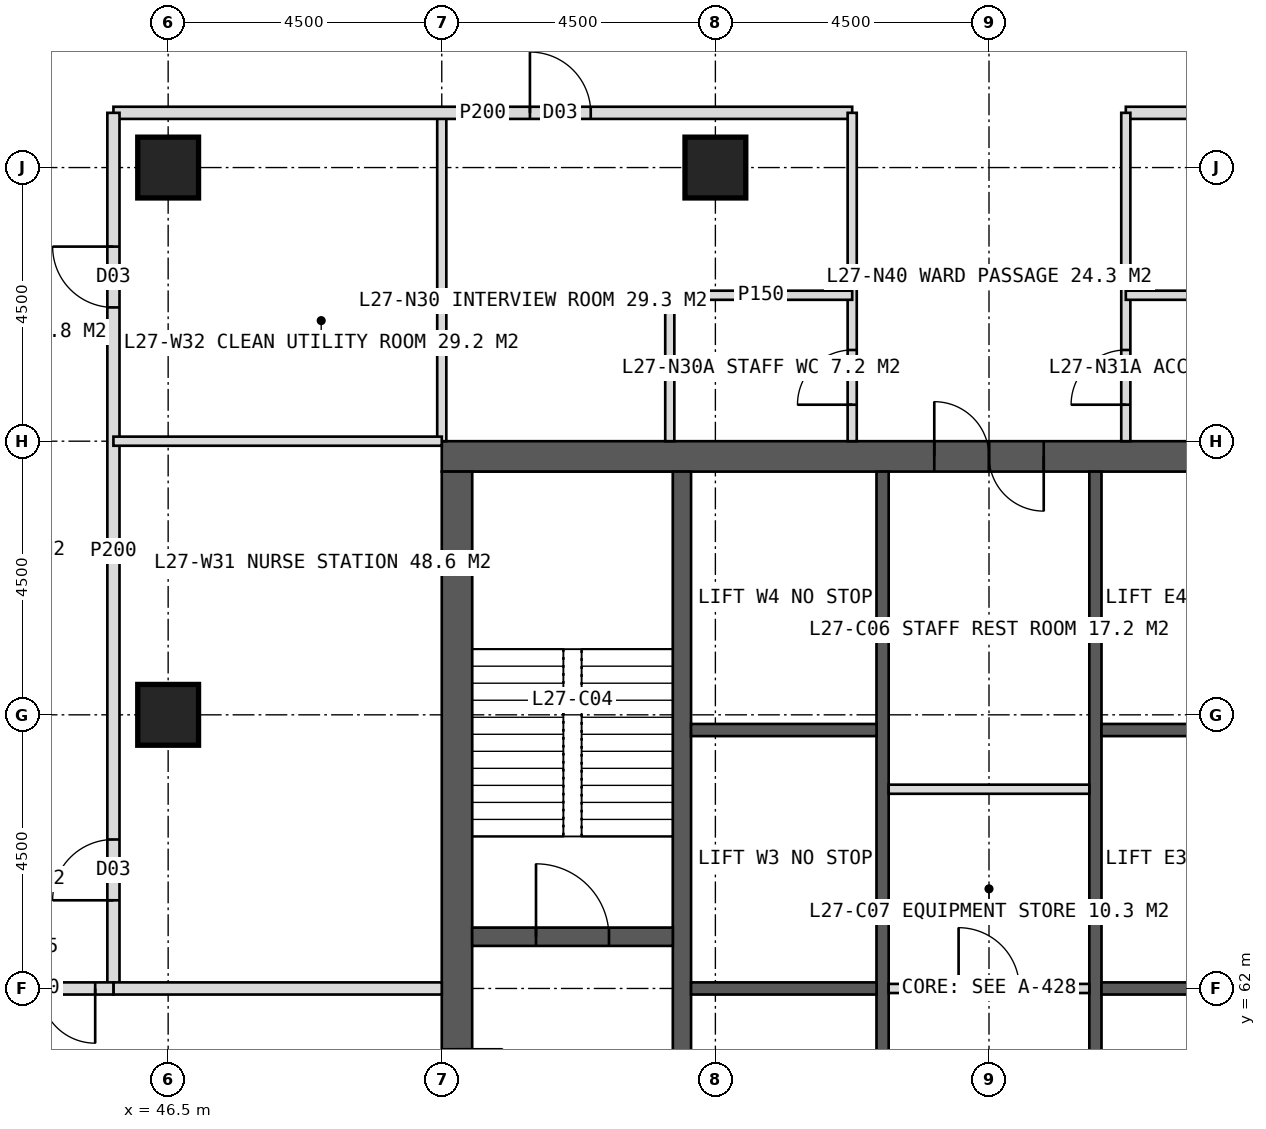
"""IFC4 building model, lengths in metres.
Left out: names, types, materials, properties, quantities, classifications, styles, units other than length and angle.
Written with IfcOpenShell. Run it as: python <this file> out.ifc"""

import sys

from ifc_helpers import new_model, si_unit, direction, frame, frame_2d, origin, origin_2d, place, context, subcontext, project, spatial, rectangle, hollow_rectangle, extrude, element, fill, save


model = new_model("IFC4")
c1 = context("Model", 3, precision=1e-05, world=origin(), true_north=direction((0.0, 1.0)))
c2 = subcontext(c1, "Body", "Model", "MODEL_VIEW")
j1 = project(units=[si_unit("LENGTHUNIT", "METRE"), si_unit("PLANEANGLEUNIT", "RADIAN")], contexts=[c1])
p1 = place(None, origin())
s1 = spatial("IfcSite", under=j1, at=p1, CompositionType="ELEMENT")
p2 = place(p1, origin())
s2 = spatial("IfcBuilding", under=s1, at=p2, CompositionType="ELEMENT")
p3 = place(p2, frame((0.0, 0.0, 116.0)))
s3 = spatial("IfcBuildingStorey", under=s2, at=p3, CompositionType="ELEMENT", Elevation=116.0)
p4 = place(p3, frame((51.0, 70.75, 0.0), z_axis=(0.0, 0.0, 1.0), x_axis=(1.0, 0.0, 0.0)))
e1 = element("IfcWall", 1, at=p4, inside=s3, PredefinedType="SHEAR", context=c2, shape_type="SweptSolid", body=[
    extrude(rectangle(XDim=18.0, YDim=0.5, at=frame_2d((9.0, 0.0))), origin(), (0.0, 0.0, 1.0), 4.0),
])
p5 = place(p4, frame((8.1, 0.0, 0.0)))
e2 = element("IfcOpeningElement", 2, at=p5, cuts=e1, PredefinedType="OPENING", context=c2, shape_type="SweptSolid", body=[
    extrude(rectangle(XDim=1.8, YDim=2.2, at=frame_2d((0.9, 1.1))), frame((0.0, 0.26, 0.0), z_axis=(0.0, -1.0, 0.0), x_axis=(1.0, 0.0, 0.0)), (0.0, 0.0, 1.0), 0.52),
])
p6 = place(p3, frame((51.25, 53.5, 0.0), z_axis=(0.0, 0.0, 1.0), x_axis=(0.0, 1.0, 0.0)))
e3 = element("IfcWall", 3, at=p6, inside=s3, PredefinedType="SHEAR", context=c2, shape_type="SweptSolid", body=[
    extrude(rectangle(XDim=17.0, YDim=0.5, at=frame_2d((8.5, 0.0))), origin(), (0.0, 0.0, 1.0), 4.0),
])
p7 = place(p6, frame((6.0, 0.0, 0.0)))
e4 = element("IfcOpeningElement", 4, at=p7, cuts=e3, PredefinedType="OPENING", context=c2, shape_type="SweptSolid", body=[
    extrude(rectangle(XDim=1.5, YDim=2.2, at=frame_2d((0.75, 1.1))), frame((0.0, 0.26, 0.0), z_axis=(0.0, -1.0, 0.0), x_axis=(1.0, 0.0, 0.0)), (0.0, 0.0, 1.0), 0.52),
])
p8 = place(p3, frame((54.95, 53.5, 0.0), z_axis=(0.0, 0.0, 1.0), x_axis=(0.0, 1.0, 0.0)))
e5 = element("IfcWall", 5, at=p8, inside=s3, PredefinedType="SHEAR", context=c2, shape_type="SweptSolid", body=[
    extrude(rectangle(XDim=17.0, YDim=0.3, at=frame_2d((8.5, 0.0))), origin(), (0.0, 0.0, 1.0), 4.0),
])
p9 = place(p3, frame((58.25, 53.5, 0.0), z_axis=(0.0, 0.0, 1.0), x_axis=(0.0, 1.0, 0.0)))
e6 = element("IfcWall", 6, at=p9, inside=s3, PredefinedType="SHEAR", context=c2, shape_type="SweptSolid", body=[
    extrude(rectangle(XDim=17.0, YDim=0.2, at=frame_2d((8.5, 0.0))), origin(), (0.0, 0.0, 1.0), 4.0),
])
p10 = place(p9, frame((1.375, 0.0, 0.0)))
e7 = element("IfcOpeningElement", 7, at=p10, cuts=e6, PredefinedType="OPENING", context=c2, shape_type="SweptSolid", body=[
    extrude(rectangle(XDim=1.4, YDim=2.2, at=frame_2d((0.7, 1.1))), frame((0.0, 0.11, 0.0), z_axis=(0.0, -1.0, 0.0), x_axis=(1.0, 0.0, 0.0)), (0.0, 0.0, 1.0), 0.22),
])
p11 = place(p9, frame((5.675, 0.0, 0.0)))
e8 = element("IfcOpeningElement", 8, at=p11, cuts=e6, PredefinedType="OPENING", context=c2, shape_type="SweptSolid", body=[
    extrude(rectangle(XDim=1.4, YDim=2.2, at=frame_2d((0.7, 1.1))), frame((0.0, 0.11, 0.0), z_axis=(0.0, -1.0, 0.0), x_axis=(1.0, 0.0, 0.0)), (0.0, 0.0, 1.0), 0.22),
])
p12 = place(p3, frame((61.75, 53.5, 0.0), z_axis=(0.0, 0.0, 1.0), x_axis=(0.0, 1.0, 0.0)))
e9 = element("IfcWall", 9, at=p12, inside=s3, PredefinedType="SHEAR", context=c2, shape_type="SweptSolid", body=[
    extrude(rectangle(XDim=17.0, YDim=0.2, at=frame_2d((8.5, 0.0))), origin(), (0.0, 0.0, 1.0), 4.0),
])
p13 = place(p12, frame((1.375, 0.0, 0.0)))
e10 = element("IfcOpeningElement", 10, at=p13, cuts=e9, PredefinedType="OPENING", context=c2, shape_type="SweptSolid", body=[
    extrude(rectangle(XDim=1.4, YDim=2.2, at=frame_2d((0.7, 1.1))), frame((0.0, 0.11, 0.0), z_axis=(0.0, -1.0, 0.0), x_axis=(1.0, 0.0, 0.0)), (0.0, 0.0, 1.0), 0.22),
])
p14 = place(p12, frame((5.675, 0.0, 0.0)))
e11 = element("IfcOpeningElement", 11, at=p14, cuts=e9, PredefinedType="OPENING", context=c2, shape_type="SweptSolid", body=[
    extrude(rectangle(XDim=1.4, YDim=2.2, at=frame_2d((0.7, 1.1))), frame((0.0, 0.11, 0.0), z_axis=(0.0, -1.0, 0.0), x_axis=(1.0, 0.0, 0.0)), (0.0, 0.0, 1.0), 0.22),
])
for number, where, z_axis, x_axis in (
    (12, (55.1, 62.0, 0.0), (0.0, 0.0, 1.0), (1.0, 0.0, 0.0)),
    (13, (61.85, 62.0, 0.0), (0.0, 0.0, 1.0), (1.0, 0.0, 0.0)),
    (14, (55.1, 66.25, 0.0), (0.0, 0.0, 1.0), (1.0, 0.0, 0.0)),
    (15, (61.85, 66.25, 0.0), (0.0, 0.0, 1.0), (1.0, 0.0, 0.0)),
):
    element("IfcWall", number, at=place(p3, frame(where, z_axis=z_axis, x_axis=x_axis)), inside=s3, PredefinedType="SHEAR", context=c2, shape_type="SweptSolid", body=[
        extrude(rectangle(XDim=3.05, YDim=0.2, at=frame_2d((1.525, 0.0))), origin(), (0.0, 0.0, 1.0), 4.0),
    ])
p15 = place(p3, frame((51.5, 62.85, 0.0), z_axis=(0.0, 0.0, 1.0), x_axis=(1.0, 0.0, 0.0)))
e16 = element("IfcWall", 16, at=p15, inside=s3, PredefinedType="SHEAR", context=c2, shape_type="SweptSolid", body=[
    extrude(rectangle(XDim=3.3, YDim=0.3, at=frame_2d((1.65, 0.0))), origin(), (0.0, 0.0, 1.0), 4.0),
])
p16 = place(p15, frame((1.05, 0.0, 0.0)))
e17 = element("IfcOpeningElement", 17, at=p16, cuts=e16, PredefinedType="OPENING", context=c2, shape_type="SweptSolid", body=[
    extrude(rectangle(XDim=1.2, YDim=2.1, at=frame_2d((0.6, 1.05))), frame((0.0, 0.16, 0.0), z_axis=(0.0, -1.0, 0.0), x_axis=(1.0, 0.0, 0.0)), (0.0, 0.0, 1.0), 0.32),
])
for number, where, z_axis, x_axis in (
    (18, (46.5, 75.5, 0.0), (0.0, 0.0, 1.0), (1.0, 0.0, 0.0)),
    (19, (55.5, 75.5, 0.0), (0.0, 0.0, 1.0), (1.0, 0.0, 0.0)),
    (20, (46.5, 66.5, 0.0), (0.0, 0.0, 1.0), (1.0, 0.0, 0.0)),
):
    element("IfcColumn", number, at=place(p3, frame(where, z_axis=z_axis, x_axis=x_axis)), inside=s3, PredefinedType="COLUMN", context=c2, shape_type="SweptSolid", body=[
        extrude(hollow_rectangle(XDim=1.0, YDim=1.0, WallThickness=0.1, at=origin_2d()), origin(), (0.0, 0.0, 1.0), 4.0),
    ])
p17 = place(p3, frame((51.0, 71.0, 0.0), z_axis=(0.0, 0.0, 1.0), x_axis=(0.0, 1.0, 0.0)))
e21 = element("IfcWall", 21, at=p17, inside=s3, PredefinedType="PARTITIONING", context=c2, shape_type="SweptSolid", body=[
    extrude(rectangle(XDim=5.4, YDim=0.15, at=frame_2d((2.7, 0.0))), origin(), (0.0, 0.0, 1.0), 3.75),
])
p18 = place(p3, frame((45.6, 76.4, 0.0), z_axis=(0.0, 0.0, 1.0), x_axis=(1.0, 0.0, 0.0)))
e22 = element("IfcWall", 22, at=p18, inside=s3, PredefinedType="PARTITIONING", context=c2, shape_type="SweptSolid", body=[
    extrude(rectangle(XDim=12.15, YDim=0.2, at=frame_2d((6.075, 0.0))), origin(), (0.0, 0.0, 1.0), 3.75),
])
p19 = place(p18, frame((6.85, 0.0, 0.0)))
e23 = element("IfcOpeningElement", 23, at=p19, cuts=e22, PredefinedType="OPENING", context=c2, shape_type="SweptSolid", body=[
    extrude(rectangle(XDim=1.0, YDim=2.1, at=frame_2d((0.5, 1.05))), frame((0.0, 0.11, 0.0), z_axis=(0.0, -1.0, 0.0), x_axis=(1.0, 0.0, 0.0)), (0.0, 0.0, 1.0), 0.22),
])
p20 = place(p3, frame((62.25, 76.4, 0.0), z_axis=(0.0, 0.0, 1.0), x_axis=(1.0, 0.0, 0.0)))
e24 = element("IfcWall", 24, at=p20, inside=s3, PredefinedType="PARTITIONING", context=c2, shape_type="SweptSolid", body=[
    extrude(rectangle(XDim=6.75, YDim=0.2, at=frame_2d((3.375, 0.0))), origin(), (0.0, 0.0, 1.0), 3.75),
])
p21 = place(p20, frame((3.55, 0.0, 0.0)))
e25 = element("IfcOpeningElement", 25, at=p21, cuts=e24, PredefinedType="OPENING", context=c2, shape_type="SweptSolid", body=[
    extrude(rectangle(XDim=1.0, YDim=2.1, at=frame_2d((0.5, 1.05))), frame((0.0, 0.11, 0.0), z_axis=(0.0, -1.0, 0.0), x_axis=(1.0, 0.0, 0.0)), (0.0, 0.0, 1.0), 0.22),
])
p22 = place(p3, frame((57.75, 71.0, 0.0), z_axis=(0.0, 0.0, 1.0), x_axis=(0.0, 1.0, 0.0)))
e26 = element("IfcWall", 26, at=p22, inside=s3, PredefinedType="PARTITIONING", context=c2, shape_type="SweptSolid", body=[
    extrude(rectangle(XDim=5.4, YDim=0.15, at=frame_2d((2.7, 0.0))), origin(), (0.0, 0.0, 1.0), 3.75),
])
p23 = place(p22, frame((0.6, 0.0, 0.0)))
e27 = element("IfcOpeningElement", 27, at=p23, cuts=e26, PredefinedType="OPENING", context=c2, shape_type="SweptSolid", body=[
    extrude(rectangle(XDim=0.9, YDim=2.1, at=frame_2d((0.45, 1.05))), frame((0.0, 0.085, 0.0), z_axis=(0.0, -1.0, 0.0), x_axis=(1.0, 0.0, 0.0)), (0.0, 0.0, 1.0), 0.17),
])
p24 = place(p3, frame((62.25, 71.0, 0.0), z_axis=(0.0, 0.0, 1.0), x_axis=(0.0, 1.0, 0.0)))
e28 = element("IfcWall", 28, at=p24, inside=s3, PredefinedType="PARTITIONING", context=c2, shape_type="SweptSolid", body=[
    extrude(rectangle(XDim=5.4, YDim=0.15, at=frame_2d((2.7, 0.0))), origin(), (0.0, 0.0, 1.0), 3.75),
])
p25 = place(p24, frame((0.6, 0.0, 0.0)))
e29 = element("IfcOpeningElement", 29, at=p25, cuts=e28, PredefinedType="OPENING", context=c2, shape_type="SweptSolid", body=[
    extrude(rectangle(XDim=0.9, YDim=2.1, at=frame_2d((0.45, 1.05))), frame((0.0, 0.085, 0.0), z_axis=(0.0, -1.0, 0.0), x_axis=(1.0, 0.0, 0.0)), (0.0, 0.0, 1.0), 0.17),
])
p26 = place(p3, frame((54.75, 73.4, 0.0), z_axis=(0.0, 0.0, 1.0), x_axis=(1.0, 0.0, 0.0)))
e30 = element("IfcWall", 30, at=p26, inside=s3, PredefinedType="PARTITIONING", context=c2, shape_type="SweptSolid", body=[
    extrude(rectangle(XDim=3.0, YDim=0.15, at=frame_2d((1.5, 0.0))), origin(), (0.0, 0.0, 1.0), 3.75),
])
p27 = place(p3, frame((54.75, 71.0, 0.0), z_axis=(0.0, 0.0, 1.0), x_axis=(0.0, 1.0, 0.0)))
e31 = element("IfcWall", 31, at=p27, inside=s3, PredefinedType="PARTITIONING", context=c2, shape_type="SweptSolid", body=[
    extrude(rectangle(XDim=2.4, YDim=0.15, at=frame_2d((1.2, 0.0))), origin(), (0.0, 0.0, 1.0), 3.75),
])
p28 = place(p3, frame((62.25, 73.4, 0.0), z_axis=(0.0, 0.0, 1.0), x_axis=(1.0, 0.0, 0.0)))
e32 = element("IfcWall", 32, at=p28, inside=s3, PredefinedType="PARTITIONING", context=c2, shape_type="SweptSolid", body=[
    extrude(rectangle(XDim=3.0, YDim=0.15, at=frame_2d((1.5, 0.0))), origin(), (0.0, 0.0, 1.0), 3.75),
])
p29 = place(p3, frame((45.6, 62.0, 0.0), z_axis=(0.0, 0.0, 1.0), x_axis=(0.0, 1.0, 0.0)))
e33 = element("IfcWall", 33, at=p29, inside=s3, PredefinedType="PARTITIONING", context=c2, shape_type="SweptSolid", body=[
    extrude(rectangle(XDim=14.4, YDim=0.2, at=frame_2d((7.2, 0.0))), origin(), (0.0, 0.0, 1.0), 3.75),
])
p30 = place(p29, frame((1.45, 0.0, 0.0)))
e34 = element("IfcOpeningElement", 34, at=p30, cuts=e33, PredefinedType="OPENING", context=c2, shape_type="SweptSolid", body=[
    extrude(rectangle(XDim=1.0, YDim=2.1, at=frame_2d((0.5, 1.05))), frame((0.0, 0.11, 0.0), z_axis=(0.0, -1.0, 0.0), x_axis=(1.0, 0.0, 0.0)), (0.0, 0.0, 1.0), 0.22),
])
p31 = place(p29, frame((11.2, 0.0, 0.0)))
e35 = element("IfcOpeningElement", 35, at=p31, cuts=e33, PredefinedType="OPENING", context=c2, shape_type="SweptSolid", body=[
    extrude(rectangle(XDim=1.0, YDim=2.1, at=frame_2d((0.5, 1.05))), frame((0.0, 0.11, 0.0), z_axis=(0.0, -1.0, 0.0), x_axis=(1.0, 0.0, 0.0)), (0.0, 0.0, 1.0), 0.22),
])
p32 = place(p3, frame((51.0, 62.0, 0.0), z_axis=(0.0, 0.0, 1.0), x_axis=(-1.0, 0.0, 0.0)))
e36 = element("IfcWall", 36, at=p32, inside=s3, PredefinedType="SOLIDWALL", context=c2, shape_type="SweptSolid", body=[
    extrude(rectangle(XDim=5.4, YDim=0.2, at=frame_2d((2.7, 0.0))), origin(), (0.0, 0.0, 1.0), 2.95),
])
p33 = place(p3, frame((51.0, 71.0, 0.0), z_axis=(0.0, 0.0, 1.0), x_axis=(-1.0, 0.0, 0.0)))
e37 = element("IfcWall", 37, at=p33, inside=s3, PredefinedType="PARTITIONING", context=c2, shape_type="SweptSolid", body=[
    extrude(rectangle(XDim=5.4, YDim=0.15, at=frame_2d((2.7, 0.0))), origin(), (0.0, 0.0, 1.0), 3.75),
])
p34 = place(p3, frame((45.6, 62.0, 0.0), z_axis=(0.0, 0.0, 1.0), x_axis=(-1.0, 0.0, 0.0)))
e38 = element("IfcWall", 38, at=p34, inside=s3, PredefinedType="SOLIDWALL", context=c2, shape_type="SweptSolid", body=[
    extrude(rectangle(XDim=2.7, YDim=0.2, at=frame_2d((1.35, 0.0))), origin(), (0.0, 0.0, 1.0), 2.95),
])
p35 = place(p34, frame((0.3, 0.0, 0.0)))
e39 = element("IfcOpeningElement", 39, at=p35, cuts=e38, PredefinedType="OPENING", context=c2, shape_type="SweptSolid", body=[
    extrude(rectangle(XDim=1.8, YDim=2.2, at=frame_2d((0.9, 1.1))), frame((0.0, 0.11, 0.0), z_axis=(0.0, -1.0, 0.0), x_axis=(1.0, 0.0, 0.0)), (0.0, 0.0, 1.0), 0.22),
])
p36 = place(p3, frame((58.35, 62.0, 0.0), z_axis=(0.0, 0.0, 1.0), x_axis=(1.0, 0.0, 0.0)))
e40 = element("IfcWall", 40, at=p36, inside=s3, PredefinedType="PARTITIONING", context=c2, shape_type="SweptSolid", body=[
    extrude(rectangle(XDim=3.3, YDim=0.15, at=frame_2d((1.65, 0.0))), origin(), (0.0, 0.0, 1.0), 3.75),
])
p37 = place(p36, frame((1.15, 0.0, 0.0)))
e41 = element("IfcOpeningElement", 41, at=p37, cuts=e40, PredefinedType="OPENING", context=c2, shape_type="SweptSolid", body=[
    extrude(rectangle(XDim=1.0, YDim=2.1, at=frame_2d((0.5, 1.05))), frame((0.0, 0.085, 0.0), z_axis=(0.0, -1.0, 0.0), x_axis=(1.0, 0.0, 0.0)), (0.0, 0.0, 1.0), 0.17),
])
p38 = place(p3, frame((58.35, 65.277, 0.0), z_axis=(0.0, 0.0, 1.0), x_axis=(1.0, 0.0, 0.0)))
e42 = element("IfcWall", 42, at=p38, inside=s3, PredefinedType="PARTITIONING", context=c2, shape_type="SweptSolid", body=[
    extrude(rectangle(XDim=3.3, YDim=0.15, at=frame_2d((1.65, 0.0))), origin(), (0.0, 0.0, 1.0), 3.75),
])
p39 = place(p23, origin())
e43 = element("IfcDoor", 43, at=p39, inside=s3, OperationType="SINGLE_SWING_LEFT", PredefinedType="DOOR", context=c2, shape_type="SweptSolid", body=[
    extrude(rectangle(XDim=0.9, YDim=2.1, at=frame_2d((0.45, 1.05))), frame((0.0, 0.025, 0.0), z_axis=(0.0, -1.0, 0.0), x_axis=(1.0, 0.0, 0.0)), (0.0, 0.0, 1.0), 0.05),
])
fill(e27, e43)
p40 = place(p19, origin())
e44 = element("IfcDoor", 44, at=p40, inside=s3, OperationType="SINGLE_SWING_LEFT", PredefinedType="DOOR", context=c2, shape_type="SweptSolid", body=[
    extrude(rectangle(XDim=1.0, YDim=2.1, at=frame_2d((0.5, 1.05))), frame((0.0, 0.025, 0.0), z_axis=(0.0, -1.0, 0.0), x_axis=(1.0, 0.0, 0.0)), (0.0, 0.0, 1.0), 0.05),
])
fill(e23, e44)
p41 = place(p25, origin())
e45 = element("IfcDoor", 45, at=p41, inside=s3, OperationType="SINGLE_SWING_LEFT", PredefinedType="DOOR", context=c2, shape_type="SweptSolid", body=[
    extrude(rectangle(XDim=0.9, YDim=2.1, at=frame_2d((0.45, 1.05))), frame((0.0, 0.025, 0.0), z_axis=(0.0, -1.0, 0.0), x_axis=(1.0, 0.0, 0.0)), (0.0, 0.0, 1.0), 0.05),
])
fill(e29, e45)
p42 = place(p30, origin())
e46 = element("IfcDoor", 46, at=p42, inside=s3, OperationType="SINGLE_SWING_LEFT", PredefinedType="DOOR", context=c2, shape_type="SweptSolid", body=[
    extrude(rectangle(XDim=1.0, YDim=2.1, at=frame_2d((0.5, 1.05))), frame((0.0, 0.025, 0.0), z_axis=(0.0, -1.0, 0.0), x_axis=(1.0, 0.0, 0.0)), (0.0, 0.0, 1.0), 0.05),
])
fill(e34, e46)
p43 = place(p31, origin())
e47 = element("IfcDoor", 47, at=p43, inside=s3, OperationType="SINGLE_SWING_RIGHT", PredefinedType="DOOR", context=c2, shape_type="SweptSolid", body=[
    extrude(rectangle(XDim=1.0, YDim=2.1, at=frame_2d((0.5, 1.05))), frame((0.0, 0.025, 0.0), z_axis=(0.0, -1.0, 0.0), x_axis=(1.0, 0.0, 0.0)), (0.0, 0.0, 1.0), 0.05),
])
fill(e35, e47)
p44 = place(p35, origin())
e48 = element("IfcDoor", 48, at=p44, inside=s3, OperationType="DOUBLE_DOOR_DOUBLE_SWING", PredefinedType="DOOR", context=c2, shape_type="SweptSolid", body=[
    extrude(rectangle(XDim=1.8, YDim=2.2, at=frame_2d((0.9, 1.1))), frame((0.0, 0.025, 0.0), z_axis=(0.0, -1.0, 0.0), x_axis=(1.0, 0.0, 0.0)), (0.0, 0.0, 1.0), 0.05),
])
fill(e39, e48)
p45 = place(p16, origin())
e49 = element("IfcDoor", 49, at=p45, inside=s3, OperationType="SINGLE_SWING_LEFT", PredefinedType="DOOR", context=c2, shape_type="SweptSolid", body=[
    extrude(rectangle(XDim=1.2, YDim=2.1, at=frame_2d((0.6, 1.05))), frame((0.0, 0.025, 0.0), z_axis=(0.0, -1.0, 0.0), x_axis=(1.0, 0.0, 0.0)), (0.0, 0.0, 1.0), 0.05),
])
fill(e17, e49)
p46 = place(p37, origin())
e50 = element("IfcDoor", 50, at=p46, inside=s3, OperationType="SINGLE_SWING_LEFT", PredefinedType="DOOR", context=c2, shape_type="SweptSolid", body=[
    extrude(rectangle(XDim=1.0, YDim=2.1, at=frame_2d((0.5, 1.05))), frame((0.0, 0.025, 0.0), z_axis=(0.0, -1.0, 0.0), x_axis=(1.0, 0.0, 0.0)), (0.0, 0.0, 1.0), 0.05),
])
fill(e41, e50)
p47 = place(p5, origin())
e51 = element("IfcDoor", 51, at=p47, inside=s3, OperationType="DOUBLE_DOOR_SINGLE_SWING", PredefinedType="DOOR", context=c2, shape_type="SweptSolid", body=[
    extrude(rectangle(XDim=1.8, YDim=2.2, at=frame_2d((0.9, 1.1))), frame((0.0, 0.025, 0.0), z_axis=(0.0, -1.0, 0.0), x_axis=(1.0, 0.0, 0.0)), (0.0, 0.0, 1.0), 0.05),
])
fill(e2, e51)
save(model, sys.argv[1])
